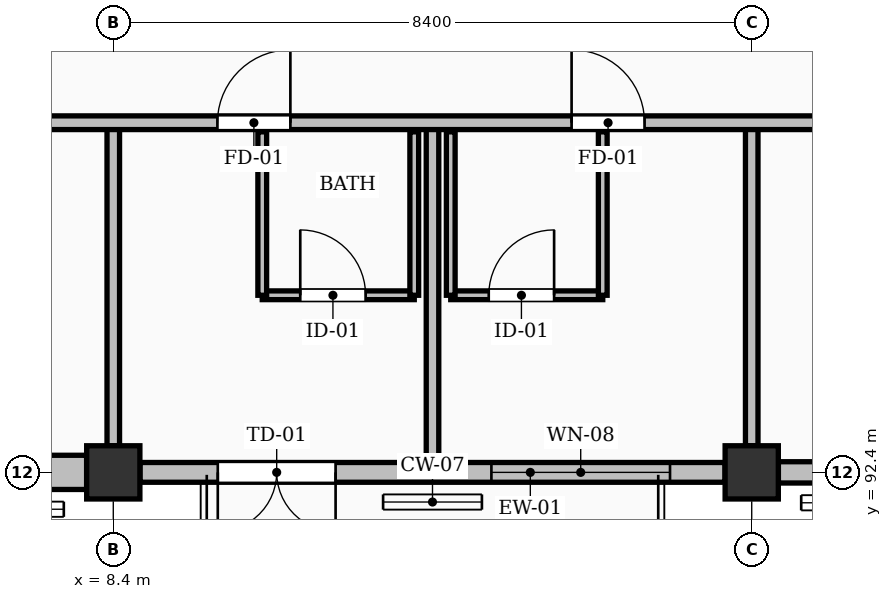
"""IFC4 building model, lengths in metres.
Left out: names, types, materials, properties, quantities, classifications, styles, units other than length and angle.
Written with IfcOpenShell. Run it as: python <this file> out.ifc"""

import sys

from ifc_helpers import new_model, si_unit, direction, frame, frame_2d, origin, origin_2d, place, context, subcontext, project, spatial, rectangle, extrude, element, fill, save


model = new_model("IFC4")
c1 = context("Model", 3, precision=1e-05, world=origin(), true_north=direction((0.0, 1.0)))
c2 = subcontext(c1, "Body", "Model", "MODEL_VIEW")
j1 = project(units=[si_unit("LENGTHUNIT", "METRE"), si_unit("PLANEANGLEUNIT", "RADIAN")], contexts=[c1])
p1 = place(None, origin())
s1 = spatial("IfcSite", under=j1, at=p1, CompositionType="ELEMENT")
p2 = place(p1, origin())
s2 = spatial("IfcBuilding", under=s1, at=p2, CompositionType="ELEMENT")
p3 = place(p2, frame((0.0, 0.0, 18.48)))
s3 = spatial("IfcBuildingStorey", under=s2, at=p3, CompositionType="ELEMENT", Elevation=18.48)
for number, where, z_axis, x_axis in (
    (1, (8.4, 92.4, 0.0), (0.0, 0.0, 1.0), (1.0, 0.0, 0.0)),
    (2, (16.8, 92.4, 0.0), (0.0, 0.0, 1.0), (1.0, 0.0, 0.0)),
):
    element("IfcColumn", number, at=place(p3, frame(where, z_axis=z_axis, x_axis=x_axis)), inside=s3, PredefinedType="COLUMN", context=c2, shape_type="SweptSolid", body=[
        extrude(rectangle(XDim=0.7, YDim=0.7, at=origin_2d()), origin(), (0.0, 0.0, 1.0), 3.36),
    ])
p4 = place(p3, frame((0.351, 92.4, 0.0), z_axis=(0.0, 0.0, 1.0), x_axis=(1.0, 0.0, 0.0)))
e3 = element("IfcWall", 3, at=p4, inside=s3, PredefinedType="SOLIDWALL", context=c2, shape_type="SweptSolid", body=[
    extrude(rectangle(XDim=7.698, YDim=0.45, at=frame_2d((3.849, 0.0))), origin(), (0.0, 0.0, 1.0), 2.494),
])
p5 = place(p4, frame((0.574, 0.0, 0.25)))
e4 = element("IfcOpeningElement", 4, at=p5, cuts=e3, PredefinedType="OPENING", context=c2, shape_type="SweptSolid", body=[
    extrude(rectangle(XDim=2.35, YDim=1.85, at=frame_2d((1.175, 0.925))), frame((0.0, 0.235, 0.0), z_axis=(0.0, -1.0, 0.0), x_axis=(1.0, 0.0, 0.0)), (0.0, 0.0, 1.0), 0.47),
])
p6 = place(p4, frame((4.774, 0.0, 0.25)))
e5 = element("IfcOpeningElement", 5, at=p6, cuts=e3, PredefinedType="OPENING", context=c2, shape_type="SweptSolid", body=[
    extrude(rectangle(XDim=2.35, YDim=1.95, at=frame_2d((1.175, 0.975))), frame((0.0, 0.235, 0.0), z_axis=(0.0, -1.0, 0.0), x_axis=(1.0, 0.0, 0.0)), (0.0, 0.0, 1.0), 0.47),
])
p7 = place(p3, frame((8.751, 92.4, 0.0), z_axis=(0.0, 0.0, 1.0), x_axis=(1.0, 0.0, 0.0)))
e6 = element("IfcWall", 6, at=p7, inside=s3, PredefinedType="SOLIDWALL", context=c2, shape_type="SweptSolid", body=[
    extrude(rectangle(XDim=7.698, YDim=0.26, at=frame_2d((3.849, 0.0))), origin(), (0.0, 0.0, 1.0), 2.494),
])
p8 = place(p7, frame((1.024, 0.0, 0.0)))
e7 = element("IfcOpeningElement", 7, at=p8, cuts=e6, PredefinedType="OPENING", context=c2, shape_type="SweptSolid", body=[
    extrude(rectangle(XDim=1.55, YDim=2.08, at=frame_2d((0.775, 1.04))), frame((0.0, 0.14, 0.0), z_axis=(0.0, -1.0, 0.0), x_axis=(1.0, 0.0, 0.0)), (0.0, 0.0, 1.0), 0.28),
])
p9 = place(p7, frame((4.624, 0.0, 0.25)))
e8 = element("IfcOpeningElement", 8, at=p9, cuts=e6, PredefinedType="OPENING", context=c2, shape_type="SweptSolid", body=[
    extrude(rectangle(XDim=2.35, YDim=1.95, at=frame_2d((1.175, 0.975))), frame((0.0, 0.14, 0.0), z_axis=(0.0, -1.0, 0.0), x_axis=(1.0, 0.0, 0.0)), (0.0, 0.0, 1.0), 0.28),
])
p10 = place(p3, frame((17.151, 92.4, 0.0), z_axis=(0.0, 0.0, 1.0), x_axis=(1.0, 0.0, 0.0)))
e9 = element("IfcWall", 9, at=p10, inside=s3, PredefinedType="SOLIDWALL", context=c2, shape_type="SweptSolid", body=[
    extrude(rectangle(XDim=7.698, YDim=0.28, at=frame_2d((3.849, 0.0))), origin(), (0.0, 0.0, 1.0), 2.494),
])
p11 = place(p10, frame((0.624, 0.0, 0.25)))
e10 = element("IfcOpeningElement", 10, at=p11, cuts=e9, PredefinedType="OPENING", context=c2, shape_type="SweptSolid", body=[
    extrude(rectangle(XDim=2.25, YDim=2.05, at=frame_2d((1.125, 1.025))), frame((0.0, 0.15, 0.0), z_axis=(0.0, -1.0, 0.0), x_axis=(1.0, 0.0, 0.0)), (0.0, 0.0, 1.0), 0.3),
])
p12 = place(p10, frame((4.799, 0.0, 0.25)))
e11 = element("IfcOpeningElement", 11, at=p12, cuts=e9, PredefinedType="OPENING", context=c2, shape_type="SweptSolid", body=[
    extrude(rectangle(XDim=2.3, YDim=1.75, at=frame_2d((1.15, 0.875))), frame((0.0, 0.15, 0.0), z_axis=(0.0, -1.0, 0.0), x_axis=(1.0, 0.0, 0.0)), (0.0, 0.0, 1.0), 0.3),
])
p13 = place(p3, frame((10.36, 94.73, 0.0), z_axis=(0.0, 0.0, 1.0), x_axis=(1.0, 0.0, 0.0)))
e12 = element("IfcWall", 12, at=p13, inside=s3, PredefinedType="PARTITIONING", context=c2, shape_type="SweptSolid", body=[
    extrude(rectangle(XDim=2.0, YDim=0.115, at=frame_2d((1.0, 0.0))), origin(), (0.0, 0.0, 1.0), 3.12),
])
p14 = place(p13, frame((0.5, 0.0, 0.0)))
e13 = element("IfcOpeningElement", 13, at=p14, cuts=e12, PredefinedType="OPENING", context=c2, shape_type="SweptSolid", body=[
    extrude(rectangle(XDim=0.86, YDim=2.05, at=frame_2d((0.43, 1.025))), frame((0.0, 0.067, 0.0), z_axis=(0.0, -1.0, 0.0), x_axis=(1.0, 0.0, 0.0)), (0.0, 0.0, 1.0), 0.135),
])
for number, where, z_axis, x_axis in (
    (14, (10.36, 94.73, 0.0), (0.0, 0.0, 1.0), (0.0, 1.0, 0.0)),
    (15, (12.36, 94.73, 0.0), (0.0, 0.0, 1.0), (0.0, 1.0, 0.0)),
):
    element("IfcWall", number, at=place(p3, frame(where, z_axis=z_axis, x_axis=x_axis)), inside=s3, PredefinedType="PARTITIONING", context=c2, shape_type="SweptSolid", body=[
        extrude(rectangle(XDim=2.15, YDim=0.115, at=frame_2d((1.075, 0.0))), origin(), (0.0, 0.0, 1.0), 3.12),
    ])
p15 = place(p3, frame((12.84, 94.73, 0.0), z_axis=(0.0, 0.0, 1.0), x_axis=(1.0, 0.0, 0.0)))
e16 = element("IfcWall", 16, at=p15, inside=s3, PredefinedType="PARTITIONING", context=c2, shape_type="SweptSolid", body=[
    extrude(rectangle(XDim=2.0, YDim=0.115, at=frame_2d((1.0, 0.0))), origin(), (0.0, 0.0, 1.0), 3.12),
])
p16 = place(p15, frame((0.5, 0.0, 0.0)))
e17 = element("IfcOpeningElement", 17, at=p16, cuts=e16, PredefinedType="OPENING", context=c2, shape_type="SweptSolid", body=[
    extrude(rectangle(XDim=0.86, YDim=2.05, at=frame_2d((0.43, 1.025))), frame((0.0, 0.067, 0.0), z_axis=(0.0, -1.0, 0.0), x_axis=(1.0, 0.0, 0.0)), (0.0, 0.0, 1.0), 0.135),
])
for number, where, z_axis, x_axis in (
    (18, (12.84, 94.73, 0.0), (0.0, 0.0, 1.0), (0.0, 1.0, 0.0)),
    (19, (14.84, 94.73, 0.0), (0.0, 0.0, 1.0), (0.0, 1.0, 0.0)),
):
    element("IfcWall", number, at=place(p3, frame(where, z_axis=z_axis, x_axis=x_axis)), inside=s3, PredefinedType="PARTITIONING", context=c2, shape_type="SweptSolid", body=[
        extrude(rectangle(XDim=2.15, YDim=0.115, at=frame_2d((1.075, 0.0))), origin(), (0.0, 0.0, 1.0), 3.12),
    ])
p17 = place(p3, frame((12.6, 92.53, 0.0), z_axis=(0.0, 0.0, 1.0), x_axis=(0.0, 1.0, 0.0)))
e20 = element("IfcWall", 20, at=p17, inside=s3, PredefinedType="PARTITIONING", context=c2, shape_type="SweptSolid", body=[
    extrude(rectangle(XDim=4.47, YDim=0.165, at=frame_2d((2.235, 0.0))), origin(), (0.0, 0.0, 1.0), 3.12),
])
for number, where, z_axis, x_axis in (
    (21, (8.4, 92.75, 0.0), (0.0, 0.0, 1.0), (0.0, 1.0, 0.0)),
    (22, (16.8, 92.75, 0.0), (0.0, 0.0, 1.0), (0.0, 1.0, 0.0)),
):
    element("IfcWall", number, at=place(p3, frame(where, z_axis=z_axis, x_axis=x_axis)), inside=s3, PredefinedType="PARTITIONING", context=c2, shape_type="SweptSolid", body=[
        extrude(rectangle(XDim=4.25, YDim=0.165, at=frame_2d((2.125, 0.0))), origin(), (0.0, 0.0, 1.0), 2.455),
    ])
p18 = place(p3, frame((0.225, 97.0, 0.0), z_axis=(0.0, 0.0, 1.0), x_axis=(1.0, 0.0, 0.0)))
e23 = element("IfcWall", 23, at=p18, inside=s3, PredefinedType="PARTITIONING", context=c2, shape_type="SweptSolid", body=[
    extrude(rectangle(XDim=50.175, YDim=0.18, at=frame_2d((25.087, 0.0))), origin(), (0.0, 0.0, 1.0), 3.12),
])
p19 = place(p18, frame((1.145, 0.0, 0.0)))
e24 = element("IfcOpeningElement", 24, at=p19, cuts=e23, PredefinedType="OPENING", context=c2, shape_type="SweptSolid", body=[
    extrude(rectangle(XDim=0.96, YDim=2.15, at=frame_2d((0.48, 1.075))), frame((0.0, 0.1, 0.0), z_axis=(0.0, -1.0, 0.0), x_axis=(1.0, 0.0, 0.0)), (0.0, 0.0, 1.0), 0.2),
])
p20 = place(p18, frame((5.805, 0.0, 0.0)))
e25 = element("IfcOpeningElement", 25, at=p20, cuts=e23, PredefinedType="OPENING", context=c2, shape_type="SweptSolid", body=[
    extrude(rectangle(XDim=0.96, YDim=2.15, at=frame_2d((0.48, 1.075))), frame((0.0, 0.1, 0.0), z_axis=(0.0, -1.0, 0.0), x_axis=(1.0, 0.0, 0.0)), (0.0, 0.0, 1.0), 0.2),
])
p21 = place(p18, frame((9.545, 0.0, 0.0)))
e26 = element("IfcOpeningElement", 26, at=p21, cuts=e23, PredefinedType="OPENING", context=c2, shape_type="SweptSolid", body=[
    extrude(rectangle(XDim=0.96, YDim=2.15, at=frame_2d((0.48, 1.075))), frame((0.0, 0.1, 0.0), z_axis=(0.0, -1.0, 0.0), x_axis=(1.0, 0.0, 0.0)), (0.0, 0.0, 1.0), 0.2),
])
p22 = place(p18, frame((14.205, 0.0, 0.0)))
e27 = element("IfcOpeningElement", 27, at=p22, cuts=e23, PredefinedType="OPENING", context=c2, shape_type="SweptSolid", body=[
    extrude(rectangle(XDim=0.96, YDim=2.15, at=frame_2d((0.48, 1.075))), frame((0.0, 0.1, 0.0), z_axis=(0.0, -1.0, 0.0), x_axis=(1.0, 0.0, 0.0)), (0.0, 0.0, 1.0), 0.2),
])
p23 = place(p18, frame((17.945, 0.0, 0.0)))
e28 = element("IfcOpeningElement", 28, at=p23, cuts=e23, PredefinedType="OPENING", context=c2, shape_type="SweptSolid", body=[
    extrude(rectangle(XDim=0.96, YDim=2.15, at=frame_2d((0.48, 1.075))), frame((0.0, 0.1, 0.0), z_axis=(0.0, -1.0, 0.0), x_axis=(1.0, 0.0, 0.0)), (0.0, 0.0, 1.0), 0.2),
])
p24 = place(p18, frame((22.605, 0.0, 0.0)))
e29 = element("IfcOpeningElement", 29, at=p24, cuts=e23, PredefinedType="OPENING", context=c2, shape_type="SweptSolid", body=[
    extrude(rectangle(XDim=0.96, YDim=2.15, at=frame_2d((0.48, 1.075))), frame((0.0, 0.1, 0.0), z_axis=(0.0, -1.0, 0.0), x_axis=(1.0, 0.0, 0.0)), (0.0, 0.0, 1.0), 0.2),
])
p25 = place(p18, frame((26.345, 0.0, 0.0)))
e30 = element("IfcOpeningElement", 30, at=p25, cuts=e23, PredefinedType="OPENING", context=c2, shape_type="SweptSolid", body=[
    extrude(rectangle(XDim=0.96, YDim=2.15, at=frame_2d((0.48, 1.075))), frame((0.0, 0.1, 0.0), z_axis=(0.0, -1.0, 0.0), x_axis=(1.0, 0.0, 0.0)), (0.0, 0.0, 1.0), 0.2),
])
p26 = place(p18, frame((31.005, 0.0, 0.0)))
e31 = element("IfcOpeningElement", 31, at=p26, cuts=e23, PredefinedType="OPENING", context=c2, shape_type="SweptSolid", body=[
    extrude(rectangle(XDim=0.96, YDim=2.15, at=frame_2d((0.48, 1.075))), frame((0.0, 0.1, 0.0), z_axis=(0.0, -1.0, 0.0), x_axis=(1.0, 0.0, 0.0)), (0.0, 0.0, 1.0), 0.2),
])
p27 = place(p18, frame((34.745, 0.0, 0.0)))
e32 = element("IfcOpeningElement", 32, at=p27, cuts=e23, PredefinedType="OPENING", context=c2, shape_type="SweptSolid", body=[
    extrude(rectangle(XDim=0.96, YDim=2.15, at=frame_2d((0.48, 1.075))), frame((0.0, 0.1, 0.0), z_axis=(0.0, -1.0, 0.0), x_axis=(1.0, 0.0, 0.0)), (0.0, 0.0, 1.0), 0.2),
])
p28 = place(p18, frame((39.405, 0.0, 0.0)))
e33 = element("IfcOpeningElement", 33, at=p28, cuts=e23, PredefinedType="OPENING", context=c2, shape_type="SweptSolid", body=[
    extrude(rectangle(XDim=0.96, YDim=2.15, at=frame_2d((0.48, 1.075))), frame((0.0, 0.1, 0.0), z_axis=(0.0, -1.0, 0.0), x_axis=(1.0, 0.0, 0.0)), (0.0, 0.0, 1.0), 0.2),
])
p29 = place(p18, frame((45.175, 0.0, 0.0)))
e34 = element("IfcOpeningElement", 34, at=p29, cuts=e23, PredefinedType="OPENING", context=c2, shape_type="SweptSolid", body=[
    extrude(rectangle(XDim=1.62, YDim=2.2, at=frame_2d((0.81, 1.1))), frame((0.0, 0.1, 0.0), z_axis=(0.0, -1.0, 0.0), x_axis=(1.0, 0.0, 0.0)), (0.0, 0.0, 1.0), 0.2),
])
p30 = place(p8, frame((1.55, 0.0, 0.0), z_axis=(0.0, 0.0, 1.0), x_axis=(-1.0, 0.0, 0.0)))
e35 = element("IfcDoor", 35, at=p30, inside=s3, OperationType="DOUBLE_DOOR_SINGLE_SWING", PredefinedType="DOOR", context=c2, shape_type="SweptSolid", body=[
    extrude(rectangle(XDim=1.55, YDim=2.08, at=frame_2d((0.775, 1.04))), frame((0.0, 0.025, 0.0), z_axis=(0.0, -1.0, 0.0), x_axis=(1.0, 0.0, 0.0)), (0.0, 0.0, 1.0), 0.05),
])
fill(e7, e35)
p31 = place(p9, origin())
e36 = element("IfcWindow", 36, at=p31, inside=s3, PartitioningType="DOUBLE_PANEL_VERTICAL", PredefinedType="WINDOW", context=c2, shape_type="SweptSolid", body=[
    extrude(rectangle(XDim=2.35, YDim=1.95, at=frame_2d((1.175, 0.975))), frame((0.0, 0.03, 0.0), z_axis=(0.0, -1.0, 0.0), x_axis=(1.0, 0.0, 0.0)), (0.0, 0.0, 1.0), 0.06),
])
fill(e8, e36)
p32 = place(p14, origin())
e37 = element("IfcDoor", 37, at=p32, inside=s3, OperationType="SINGLE_SWING_LEFT", PredefinedType="DOOR", context=c2, shape_type="SweptSolid", body=[
    extrude(rectangle(XDim=0.86, YDim=2.05, at=frame_2d((0.43, 1.025))), frame((0.0, 0.025, 0.0), z_axis=(0.0, -1.0, 0.0), x_axis=(1.0, 0.0, 0.0)), (0.0, 0.0, 1.0), 0.05),
])
fill(e13, e37)
p33 = place(p16, origin())
e38 = element("IfcDoor", 38, at=p33, inside=s3, OperationType="SINGLE_SWING_RIGHT", PredefinedType="DOOR", context=c2, shape_type="SweptSolid", body=[
    extrude(rectangle(XDim=0.86, YDim=2.05, at=frame_2d((0.43, 1.025))), frame((0.0, 0.025, 0.0), z_axis=(0.0, -1.0, 0.0), x_axis=(1.0, 0.0, 0.0)), (0.0, 0.0, 1.0), 0.05),
])
fill(e17, e38)
p34 = place(p21, origin())
e39 = element("IfcDoor", 39, at=p34, inside=s3, OperationType="SINGLE_SWING_RIGHT", PredefinedType="DOOR", context=c2, shape_type="SweptSolid", body=[
    extrude(rectangle(XDim=0.96, YDim=2.15, at=frame_2d((0.48, 1.075))), frame((0.0, 0.025, 0.0), z_axis=(0.0, -1.0, 0.0), x_axis=(1.0, 0.0, 0.0)), (0.0, 0.0, 1.0), 0.05),
])
fill(e26, e39)
p35 = place(p22, origin())
e40 = element("IfcDoor", 40, at=p35, inside=s3, OperationType="SINGLE_SWING_LEFT", PredefinedType="DOOR", context=c2, shape_type="SweptSolid", body=[
    extrude(rectangle(XDim=0.96, YDim=2.15, at=frame_2d((0.48, 1.075))), frame((0.0, 0.025, 0.0), z_axis=(0.0, -1.0, 0.0), x_axis=(1.0, 0.0, 0.0)), (0.0, 0.0, 1.0), 0.05),
])
fill(e27, e40)
save(model, sys.argv[1])
